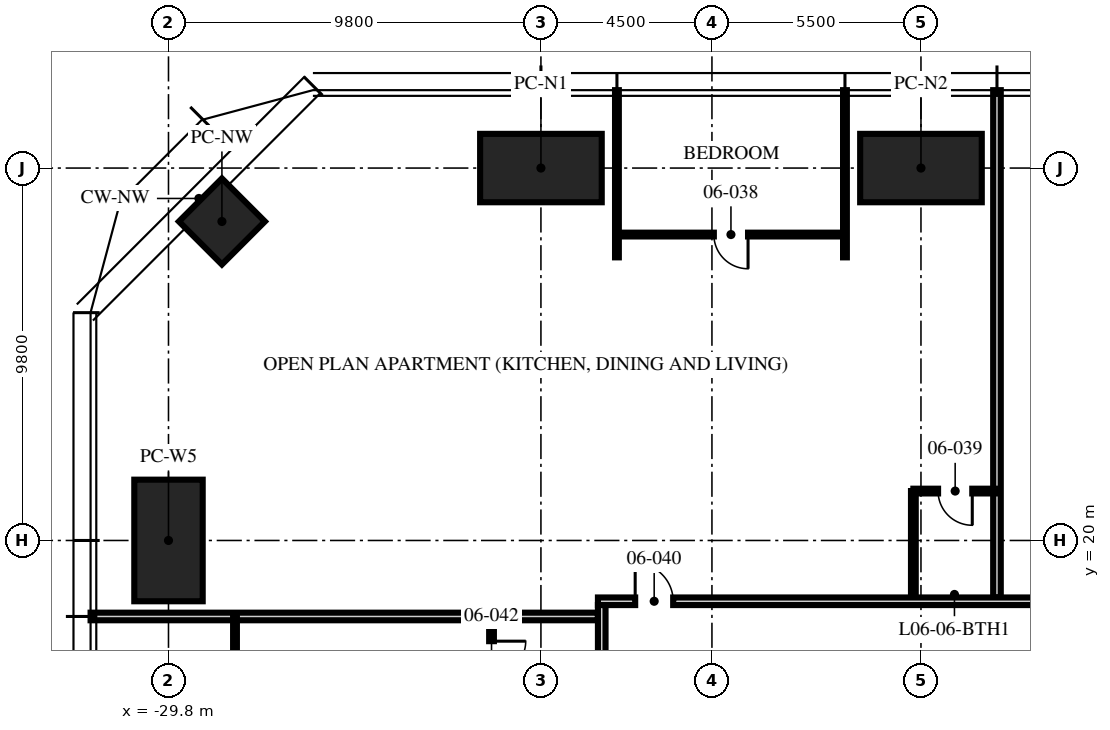
"""IFC4 building model, lengths in metres.
Left out: names, types, materials, properties, quantities, classifications, styles, units other than length and angle.
Written with IfcOpenShell. Run it as: python <this file> out.ifc"""

import sys

from ifc_helpers import new_model, si_unit, direction, frame, frame_2d, origin, origin_2d, place, context, subcontext, project, spatial, rectangle, hollow_rectangle, extrude, element, fill, save


model = new_model("IFC4")
c1 = context("Model", 3, precision=1e-05, world=origin(), true_north=direction((0.0, 1.0)))
c2 = subcontext(c1, "Body", "Model", "MODEL_VIEW")
j1 = project(units=[si_unit("LENGTHUNIT", "METRE"), si_unit("PLANEANGLEUNIT", "RADIAN")], contexts=[c1])
p1 = place(None, origin())
s1 = spatial("IfcSite", under=j1, at=p1, CompositionType="ELEMENT")
p2 = place(p1, origin())
s2 = spatial("IfcBuilding", under=s1, at=p2, CompositionType="ELEMENT")
p3 = place(p2, frame((0.0, 0.0, 28.5)))
s3 = spatial("IfcBuildingStorey", under=s2, at=p3, CompositionType="ELEMENT", Elevation=28.5)
for number, where, z_axis, x_axis in (
    (1, (-20.0, 29.8, 0.0), (0.0, 0.0, 1.0), (1.0, 0.0, 0.0)),
    (2, (-10.0, 29.8, 0.0), (0.0, 0.0, 1.0), (1.0, 0.0, 0.0)),
    (3, (-29.8, 20.0, 0.0), (0.0, 0.0, 1.0), (0.0, 1.0, 0.0)),
):
    element("IfcColumn", number, at=place(p3, frame(where, z_axis=z_axis, x_axis=x_axis)), inside=s3, PredefinedType="COLUMN", context=c2, shape_type="SweptSolid", body=[
        extrude(hollow_rectangle(XDim=3.2, YDim=1.8, WallThickness=0.2, at=origin_2d()), origin(), (0.0, 0.0, 1.0), 3.75),
    ])
p4 = place(p3, frame((-28.394, 28.394, 0.0), z_axis=(0.0, 0.0, 1.0), x_axis=(0.707106781187, 0.707106781187, 0.0)))
e4 = element("IfcColumn", 4, at=p4, inside=s3, PredefinedType="COLUMN", context=c2, shape_type="SweptSolid", body=[
    extrude(hollow_rectangle(XDim=1.6, YDim=1.6, WallThickness=0.1, at=origin_2d()), origin(), (0.0, 0.0, 1.0), 3.75),
])
p5 = place(p3, frame((-8.0, 18.5, 0.0), z_axis=(0.0, 0.0, 1.0), x_axis=(0.0, 1.0, 0.0)))
e5 = element("IfcWall", 5, at=p5, inside=s3, PredefinedType="PARTITIONING", context=c2, shape_type="SweptSolid", body=[
    extrude(rectangle(XDim=13.35, YDim=0.2, at=frame_2d((6.675, 0.0))), origin(), (0.0, 0.0, 1.0), 2.71),
])
for number, where, z_axis, x_axis in (
    (6, (-12.0, 27.45, 0.0), (0.0, 0.0, 1.0), (0.0, 1.0, 0.0)),
    (7, (-18.0, 27.45, 0.0), (0.0, 0.0, 1.0), (0.0, 1.0, 0.0)),
):
    element("IfcWall", number, at=place(p3, frame(where, z_axis=z_axis, x_axis=x_axis)), inside=s3, PredefinedType="PARTITIONING", context=c2, shape_type="SweptSolid", body=[
        extrude(rectangle(XDim=4.4, YDim=0.1, at=frame_2d((2.2, 0.0))), origin(), (0.0, 0.0, 1.0), 2.71),
    ])
p6 = place(p3, frame((-18.5, 18.0, 0.0), z_axis=(0.0, 0.0, 1.0), x_axis=(-1.0, 0.0, 0.0)))
e8 = element("IfcWall", 8, at=p6, inside=s3, PredefinedType="PARTITIONING", context=c2, shape_type="SweptSolid", body=[
    extrude(rectangle(XDim=13.35, YDim=0.2, at=frame_2d((6.675, 0.0))), origin(), (0.0, 0.0, 1.0), 2.3),
])
p7 = place(p3, frame((-12.0, 28.05, 0.0), z_axis=(0.0, 0.0, 1.0), x_axis=(-1.0, 0.0, 0.0)))
e9 = element("IfcWall", 9, at=p7, inside=s3, PredefinedType="PARTITIONING", context=c2, shape_type="SweptSolid", body=[
    extrude(rectangle(XDim=6.0, YDim=0.1, at=frame_2d((3.0, 0.0))), origin(), (0.0, 0.0, 1.0), 2.61),
])
p8 = place(p7, frame((2.55, 0.0, 0.0)))
e10 = element("IfcOpeningElement", 10, at=p8, cuts=e9, PredefinedType="OPENING", context=c2, shape_type="SweptSolid", body=[
    extrude(rectangle(XDim=0.9, YDim=2.1, at=frame_2d((0.45, 1.05))), frame((0.0, 0.06, 0.0), z_axis=(0.0, -1.0, 0.0), x_axis=(1.0, 0.0, 0.0)), (0.0, 0.0, 1.0), 0.12),
])
p9 = place(p3, frame((-8.0, 21.3, 0.0), z_axis=(0.0, 0.0, 1.0), x_axis=(-1.0, 0.0, 0.0)))
e11 = element("IfcWall", 11, at=p9, inside=s3, PredefinedType="PARTITIONING", context=c2, shape_type="SweptSolid", body=[
    extrude(rectangle(XDim=2.2, YDim=0.125, at=frame_2d((1.1, 0.0))), origin(), (0.0, 0.0, 1.0), 2.492),
])
p10 = place(p9, frame((0.65, 0.0, 0.0)))
e12 = element("IfcOpeningElement", 12, at=p10, cuts=e11, PredefinedType="OPENING", context=c2, shape_type="SweptSolid", body=[
    extrude(rectangle(XDim=0.9, YDim=2.1, at=frame_2d((0.45, 1.05))), frame((0.0, 0.073, 0.0), z_axis=(0.0, -1.0, 0.0), x_axis=(1.0, 0.0, 0.0)), (0.0, 0.0, 1.0), 0.145),
])
p11 = place(p3, frame((-10.2, 18.5, 0.0), z_axis=(0.0, 0.0, 1.0), x_axis=(0.0, 1.0, 0.0)))
e13 = element("IfcWall", 13, at=p11, inside=s3, PredefinedType="PARTITIONING", context=c2, shape_type="SweptSolid", body=[
    extrude(rectangle(XDim=2.8, YDim=0.125, at=frame_2d((1.4, 0.0))), origin(), (0.0, 0.0, 1.0), 2.492),
])
p12 = place(p3, frame((-28.05, 18.0, 0.0), z_axis=(0.0, 0.0, 1.0), x_axis=(0.0, -1.0, 0.0)))
e14 = element("IfcWall", 14, at=p12, inside=s3, PredefinedType="PARTITIONING", context=c2, shape_type="SweptSolid", body=[
    extrude(rectangle(XDim=6.0, YDim=0.1, at=frame_2d((3.0, 0.0))), origin(), (0.0, 0.0, 1.0), 2.61),
])
p13 = place(p12, frame((2.55, 0.0, 0.0)))
e15 = element("IfcOpeningElement", 15, at=p13, cuts=e14, PredefinedType="OPENING", context=c2, shape_type="SweptSolid", body=[
    extrude(rectangle(XDim=0.9, YDim=2.1, at=frame_2d((0.45, 1.05))), frame((0.0, 0.06, 0.0), z_axis=(0.0, -1.0, 0.0), x_axis=(1.0, 0.0, 0.0)), (0.0, 0.0, 1.0), 0.12),
])
p14 = place(p3, frame((-21.3, 18.0, 0.0), z_axis=(0.0, 0.0, 1.0), x_axis=(0.0, -1.0, 0.0)))
e16 = element("IfcWall", 16, at=p14, inside=s3, PredefinedType="PARTITIONING", context=c2, shape_type="SweptSolid", body=[
    extrude(rectangle(XDim=2.2, YDim=0.125, at=frame_2d((1.1, 0.0))), origin(), (0.0, 0.0, 1.0), 3.5),
])
p15 = place(p14, frame((0.65, 0.0, 0.0)))
e17 = element("IfcOpeningElement", 17, at=p15, cuts=e16, PredefinedType="OPENING", context=c2, shape_type="SweptSolid", body=[
    extrude(rectangle(XDim=0.9, YDim=2.1, at=frame_2d((0.45, 1.05))), frame((0.0, 0.073, 0.0), z_axis=(0.0, -1.0, 0.0), x_axis=(1.0, 0.0, 0.0)), (0.0, 0.0, 1.0), 0.145),
])
p16 = place(p3, frame((-18.5, 18.4, 0.0), z_axis=(0.0, 0.0, 1.0), x_axis=(1.0, 0.0, 0.0)))
e18 = element("IfcWall", 18, at=p16, inside=s3, PredefinedType="PARTITIONING", context=c2, shape_type="SweptSolid", body=[
    extrude(rectangle(XDim=14.5, YDim=0.2, at=frame_2d((7.25, 0.0))), origin(), (0.0, 0.0, 1.0), 2.3),
])
p17 = place(p16, frame((0.98, 0.0, 0.0)))
e19 = element("IfcOpeningElement", 19, at=p17, cuts=e18, PredefinedType="OPENING", context=c2, shape_type="SweptSolid", body=[
    extrude(rectangle(XDim=1.0, YDim=2.2, at=frame_2d((0.5, 1.1))), frame((0.0, 0.11, 0.0), z_axis=(0.0, -1.0, 0.0), x_axis=(1.0, 0.0, 0.0)), (0.0, 0.0, 1.0), 0.22),
])
p18 = place(p3, frame((-18.4, 18.3, 0.0), z_axis=(0.0, 0.0, 1.0), x_axis=(0.0, -1.0, 0.0)))
e20 = element("IfcWall", 20, at=p18, inside=s3, PredefinedType="PARTITIONING", context=c2, shape_type="SweptSolid", body=[
    extrude(rectangle(XDim=8.3, YDim=0.2, at=frame_2d((4.15, 0.0))), origin(), (0.0, 0.0, 1.0), 2.3),
])
p19 = place(p8, origin())
e21 = element("IfcDoor", 21, at=p19, inside=s3, OperationType="SINGLE_SWING_LEFT", PredefinedType="DOOR", context=c2, shape_type="SweptSolid", body=[
    extrude(rectangle(XDim=0.9, YDim=2.1, at=frame_2d((0.45, 1.05))), frame((0.0, 0.025, 0.0), z_axis=(0.0, -1.0, 0.0), x_axis=(1.0, 0.0, 0.0)), (0.0, 0.0, 1.0), 0.05),
])
fill(e10, e21)
p20 = place(p10, origin())
e22 = element("IfcDoor", 22, at=p20, inside=s3, OperationType="SINGLE_SWING_LEFT", PredefinedType="DOOR", context=c2, shape_type="SweptSolid", body=[
    extrude(rectangle(XDim=0.9, YDim=2.1, at=frame_2d((0.45, 1.05))), frame((0.0, 0.025, 0.0), z_axis=(0.0, -1.0, 0.0), x_axis=(1.0, 0.0, 0.0)), (0.0, 0.0, 1.0), 0.05),
])
fill(e12, e22)
p21 = place(p17, origin())
e23 = element("IfcDoor", 23, at=p21, inside=s3, OperationType="SINGLE_SWING_LEFT", PredefinedType="DOOR", context=c2, shape_type="SweptSolid", body=[
    extrude(rectangle(XDim=1.0, YDim=2.2, at=frame_2d((0.5, 1.1))), frame((0.0, 0.025, 0.0), z_axis=(0.0, -1.0, 0.0), x_axis=(1.0, 0.0, 0.0)), (0.0, 0.0, 1.0), 0.05),
])
fill(e19, e23)
p22 = place(p15, origin())
e24 = element("IfcDoor", 24, at=p22, inside=s3, OperationType="SINGLE_SWING_LEFT", PredefinedType="DOOR", context=c2, shape_type="SweptSolid", body=[
    extrude(rectangle(XDim=0.9, YDim=2.1, at=frame_2d((0.45, 1.05))), frame((0.0, 0.025, 0.0), z_axis=(0.0, -1.0, 0.0), x_axis=(1.0, 0.0, 0.0)), (0.0, 0.0, 1.0), 0.05),
])
fill(e17, e24)
save(model, sys.argv[1])
